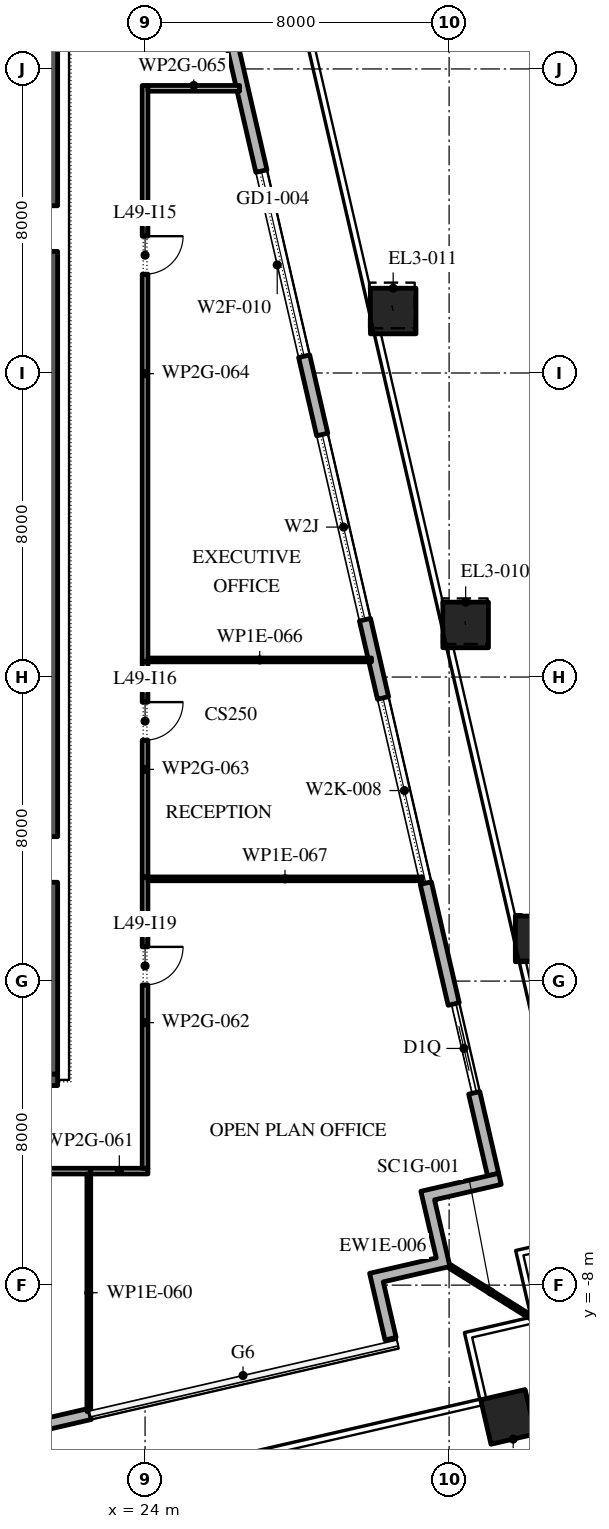
"""IFC4 building model, lengths in metres.
Left out: names, types, materials, properties, quantities, classifications, styles, units other than length and angle.
Written with IfcOpenShell. Run it as: python <this file> out.ifc"""

import sys

from ifc_helpers import new_model, si_unit, direction, frame, frame_2d, origin, origin_2d, place, context, subcontext, project, spatial, polyline, rectangle, outline, extrude, element, fill, save


model = new_model("IFC4")
c1 = context("Model", 3, precision=1e-05, world=origin(), true_north=direction((0.0, 1.0)))
c2 = subcontext(c1, "Body", "Model", "MODEL_VIEW")
j1 = project(units=[si_unit("LENGTHUNIT", "METRE"), si_unit("PLANEANGLEUNIT", "RADIAN")], contexts=[c1])
p1 = place(None, origin())
s1 = spatial("IfcSite", under=j1, at=p1, CompositionType="ELEMENT")
p2 = place(p1, origin())
s2 = spatial("IfcBuilding", under=s1, at=p2, CompositionType="ELEMENT")
p3 = place(p2, frame((0.0, 0.0, 222.0)))
s3 = spatial("IfcBuildingStorey", under=s2, at=p3, CompositionType="ELEMENT", Elevation=222.0)
p4 = place(p3, frame((33.551, -11.467, 0.0), z_axis=(0.0, 0.0, 1.0), x_axis=(0.974370064785, 0.224951054344, 0.0)))
e1 = element("IfcColumn", 1, at=p4, inside=s3, PredefinedType="COLUMN", context=c2, shape_type="SweptSolid", body=[
    extrude(rectangle(XDim=1.2, YDim=1.2, at=origin_2d()), origin(), (0.0, 0.0, 1.0), 4.2),
])
p5 = place(p3, frame((34.342, 1.111, 0.0), z_axis=(-0.002731884952, 0.01168316756, 0.999928017609), x_axis=(-0.973733900744, -0.227689021567, 0.0)))
e2 = element("IfcColumn", 2, at=p5, inside=s3, PredefinedType="COLUMN", context=c2, shape_type="SweptSolid", body=[
    extrude(rectangle(XDim=1.2, YDim=1.2, at=origin_2d()), origin(), (0.0, 0.0, 1.0), 4.2),
])
p6 = place(p3, frame((32.435, 9.37, 0.0), z_axis=(-0.005404479485, 0.023361298418, 0.999712479335), x_axis=(-0.974268511785, -0.225390476607, 0.0)))
e3 = element("IfcColumn", 3, at=p6, inside=s3, PredefinedType="COLUMN", context=c2, shape_type="SweptSolid", body=[
    extrude(rectangle(XDim=1.2, YDim=1.2, at=origin_2d()), origin(), (0.0, 0.0, 1.0), 4.201),
])
p7 = place(p3, frame((30.528, 17.63, 0.0), z_axis=(-0.0080747472, 0.035087390713, 0.999351626541), x_axis=(-0.974526982896, -0.224270282488, 0.0)))
e4 = element("IfcColumn", 4, at=p7, inside=s3, PredefinedType="COLUMN", context=c2, shape_type="SweptSolid", body=[
    extrude(rectangle(XDim=1.2, YDim=1.2, at=origin_2d()), origin(), (0.0, 0.0, 1.0), 4.203),
])
p8 = place(p3, frame((14.465, -13.256, 0.0), z_axis=(0.0, 0.0, 1.0), x_axis=(0.974368386566, 0.224958323385, 0.0)))
e5 = element("IfcWall", 5, at=p8, inside=s3, PredefinedType="STANDARD", context=c2, shape_type="SweptSolid", body=[
    extrude(rectangle(XDim=8.3, YDim=0.3, at=frame_2d((4.15, 0.0))), origin(), (0.0, 0.0, 1.0), 3.75),
])
p9 = place(p8, frame((2.95, 0.0, 0.0)))
e6 = element("IfcOpeningElement", 6, at=p9, cuts=e5, PredefinedType="OPENING", context=c2, shape_type="SweptSolid", body=[
    extrude(rectangle(XDim=2.4, YDim=3.025, at=frame_2d((1.2, 1.512))), frame((0.0, 0.16, 0.0), z_axis=(0.0, -1.0, 0.0), x_axis=(1.0, 0.0, 0.0)), (0.0, 0.0, 1.0), 0.32),
])
p10 = place(p3, frame((33.157, -5.092, 0.0), z_axis=(0.0, 0.0, 1.0), x_axis=(-0.224950279389, 0.974370243697, 0.0)))
e7 = element("IfcWall", 7, at=p10, inside=s3, PredefinedType="STANDARD", context=c2, shape_type="SweptSolid", body=[
    extrude(rectangle(XDim=49.5, YDim=0.3, at=frame_2d((24.75, 0.0))), origin(), (0.0, 0.0, 1.0), 3.75),
])
p11 = place(p10, frame((2.207, 0.0, 0.0)))
e8 = element("IfcOpeningElement", 8, at=p11, cuts=e7, PredefinedType="OPENING", context=c2, shape_type="SweptSolid", body=[
    extrude(rectangle(XDim=2.4, YDim=2.875, at=frame_2d((1.2, 1.438))), frame((0.0, 0.16, 0.0), z_axis=(0.0, -1.0, 0.0), x_axis=(1.0, 0.0, 0.0)), (0.0, 0.0, 1.0), 0.32),
])
p12 = place(p10, frame((7.871, 0.0, 0.45)))
e9 = element("IfcOpeningElement", 9, at=p12, cuts=e7, PredefinedType="OPENING", context=c2, shape_type="SweptSolid", body=[
    extrude(rectangle(XDim=5.0, YDim=2.575, at=frame_2d((2.5, 1.288))), frame((0.0, 0.16, 0.0), z_axis=(0.0, -1.0, 0.0), x_axis=(1.0, 0.0, 0.0)), (0.0, 0.0, 1.0), 0.32),
])
p13 = place(p10, frame((14.986, 0.0, 0.45)))
e10 = element("IfcOpeningElement", 10, at=p13, cuts=e7, PredefinedType="OPENING", context=c2, shape_type="SweptSolid", body=[
    extrude(rectangle(XDim=5.0, YDim=2.625, at=frame_2d((2.5, 1.312))), frame((0.0, 0.16, 0.0), z_axis=(0.0, -1.0, 0.0), x_axis=(1.0, 0.0, 0.0)), (0.0, 0.0, 1.0), 0.32),
])
p14 = place(p10, frame((22.1, 0.0, 0.45)))
e11 = element("IfcOpeningElement", 11, at=p14, cuts=e7, PredefinedType="OPENING", context=c2, shape_type="SweptSolid", body=[
    extrude(rectangle(XDim=5.0, YDim=2.75, at=frame_2d((2.5, 1.375))), frame((0.0, 0.16, 0.0), z_axis=(0.0, -1.0, 0.0), x_axis=(1.0, 0.0, 0.0)), (0.0, 0.0, 1.0), 0.32),
])
p15 = place(p10, frame((30.514, 0.0, 0.0)))
e12 = element("IfcOpeningElement", 12, at=p15, cuts=e7, PredefinedType="OPENING", context=c2, shape_type="SweptSolid", body=[
    extrude(rectangle(XDim=2.4, YDim=3.2, at=frame_2d((1.2, 1.6))), frame((0.0, 0.16, 0.0), z_axis=(0.0, -1.0, 0.0), x_axis=(1.0, 0.0, 0.0)), (0.0, 0.0, 1.0), 0.32),
])
p16 = place(p10, frame((36.329, 0.0, 0.45)))
e13 = element("IfcOpeningElement", 13, at=p16, cuts=e7, PredefinedType="OPENING", context=c2, shape_type="SweptSolid", body=[
    extrude(rectangle(XDim=5.0, YDim=3.25, at=frame_2d((2.5, 1.625))), frame((0.0, 0.16, 0.0), z_axis=(0.0, -1.0, 0.0), x_axis=(1.0, 0.0, 0.0)), (0.0, 0.0, 1.0), 0.32),
])
p17 = place(p10, frame((43.443, 0.0, 0.45)))
e14 = element("IfcOpeningElement", 14, at=p17, cuts=e7, PredefinedType="OPENING", context=c2, shape_type="SweptSolid", body=[
    extrude(rectangle(XDim=5.0, YDim=3.25, at=frame_2d((2.5, 1.625))), frame((0.0, 0.16, 0.0), z_axis=(0.0, -1.0, 0.0), x_axis=(1.0, 0.0, 0.0)), (0.0, 0.0, 1.0), 0.32),
])
p18 = place(p3, origin())
e15 = element("IfcWall", 15, at=p18, inside=s3, PredefinedType="STANDARD", context=c2, shape_type="SweptSolid", body=[
    extrude(outline(polyline([(31.662, -7.285), (31.257, -5.531), (33.303, -5.058), (33.371, -5.351), (31.617, -5.756), (32.022, -7.51), (30.268, -7.914), (30.605, -9.376), (30.313, -9.443), (29.908, -7.69), (31.662, -7.285)])), origin(), (0.0, 0.0, 1.0), 3.75),
])
p19 = place(p3, frame((32.022, -7.51, -0.05), z_axis=(0.0, 0.0, 1.0), x_axis=(0.848047176257, -0.529920736377, 0.0)))
e16 = element("IfcWall", 16, at=p19, inside=s3, PredefinedType="STANDARD", context=c2, shape_type="SweptSolid", body=[
    extrude(rectangle(XDim=2.526, YDim=0.1, at=frame_2d((1.263, 0.0))), origin(), (0.0, 0.0, 1.0), 3.8),
])
p20 = place(p3, frame((21.35, -2.45, 0.0), z_axis=(0.0, 0.0, 1.0), x_axis=(0.0, 1.0, 0.0)))
e17 = element("IfcWall", 17, at=p20, inside=s3, PredefinedType="SHEAR", context=c2, shape_type="SweptSolid", body=[
    extrude(rectangle(XDim=27.9, YDim=0.7, at=frame_2d((13.95, 0.0))), origin(), (0.0, 0.0, 1.0), 3.75),
])
p21 = place(p20, frame((5.05, 0.0, 0.0)))
e18 = element("IfcOpeningElement", 18, at=p21, cuts=e17, PredefinedType="OPENING", context=c2, shape_type="SweptSolid", body=[
    extrude(rectangle(XDim=1.2, YDim=2.1, at=frame_2d((0.6, 1.05))), frame((0.0, 0.36, 0.0), z_axis=(0.0, -1.0, 0.0), x_axis=(1.0, 0.0, 0.0)), (0.0, 0.0, 1.0), 0.72),
])
p22 = place(p20, frame((21.65, 0.0, 0.0)))
e19 = element("IfcOpeningElement", 19, at=p22, cuts=e17, PredefinedType="OPENING", context=c2, shape_type="SweptSolid", body=[
    extrude(rectangle(XDim=1.2, YDim=2.1, at=frame_2d((0.6, 1.05))), frame((0.0, 0.36, 0.0), z_axis=(0.0, -1.0, 0.0), x_axis=(1.0, 0.0, 0.0)), (0.0, 0.0, 1.0), 0.72),
])
p23 = place(p3, frame((10.3, -2.6, 0.0), z_axis=(0.0, 0.0, 1.0), x_axis=(1.0, 0.0, 0.0)))
e20 = element("IfcWall", 20, at=p23, inside=s3, PredefinedType="SHEAR", context=c2, shape_type="SweptSolid", body=[
    extrude(rectangle(XDim=11.4, YDim=0.3, at=frame_2d((5.7, 0.0))), origin(), (0.0, 0.0, 1.0), 3.75),
])
p24 = place(p3, frame((22.57, -5.0, 0.0), z_axis=(0.0, 0.0, 1.0), x_axis=(-1.0, 0.0, 0.0)))
e21 = element("IfcWall", 21, at=p24, inside=s3, PredefinedType="PARTITIONING", context=c2, shape_type="SweptSolid", body=[
    extrude(rectangle(XDim=12.57, YDim=0.15, at=frame_2d((6.285, 0.0))), origin(), (0.0, 0.0, 1.0), 3.75),
])
p25 = place(p24, frame((8.42, 0.0, 0.0)))
e22 = element("IfcOpeningElement", 22, at=p25, cuts=e21, PredefinedType="OPENING", context=c2, shape_type="SweptSolid", body=[
    extrude(rectangle(XDim=1.0, YDim=2.1, at=frame_2d((0.5, 1.05))), frame((0.0, 0.085, 0.0), z_axis=(0.0, -1.0, 0.0), x_axis=(1.0, 0.0, 0.0)), (0.0, 0.0, 1.0), 0.17),
])
p26 = place(p3, frame((22.52, -5.075, 0.0), z_axis=(0.0, 0.0, 1.0), x_axis=(0.0, -1.0, 0.0)))
e23 = element("IfcWall", 23, at=p26, inside=s3, PredefinedType="PARTITIONING", context=c2, shape_type="SweptSolid", body=[
    extrude(rectangle(XDim=6.25, YDim=0.1, at=frame_2d((3.125, 0.0))), origin(), (0.0, 0.0, 1.0), 3.75),
])
p27 = place(p3, frame((24.075, -5.0, 0.0), z_axis=(0.0, 0.0, 1.0), x_axis=(-1.0, 0.0, 0.0)))
e24 = element("IfcWall", 24, at=p27, inside=s3, PredefinedType="PARTITIONING", context=c2, shape_type="SweptSolid", body=[
    extrude(rectangle(XDim=1.505, YDim=0.15, at=frame_2d((0.752, 0.0))), origin(), (0.0, 0.0, 1.0), 3.75),
])
p28 = place(p3, frame((24.0, 2.74, 0.0), z_axis=(0.0, 0.0, 1.0), x_axis=(0.0, -1.0, 0.0)))
e25 = element("IfcWall", 25, at=p28, inside=s3, PredefinedType="PARTITIONING", context=c2, shape_type="SweptSolid", body=[
    extrude(rectangle(XDim=7.665, YDim=0.15, at=frame_2d((3.833, 0.0))), origin(), (0.0, 0.0, 1.0), 3.75),
])
p29 = place(p28, frame((1.84, 0.0, 0.0)))
e26 = element("IfcOpeningElement", 26, at=p29, cuts=e25, PredefinedType="OPENING", context=c2, shape_type="SweptSolid", body=[
    extrude(rectangle(XDim=1.0, YDim=2.1, at=frame_2d((0.5, 1.05))), frame((0.0, 0.085, 0.0), z_axis=(0.0, -1.0, 0.0), x_axis=(1.0, 0.0, 0.0)), (0.0, 0.0, 1.0), 0.17),
])
p30 = place(p3, frame((24.0, 8.4, 0.0), z_axis=(0.0, 0.0, 1.0), x_axis=(0.0, -1.0, 0.0)))
e27 = element("IfcWall", 27, at=p30, inside=s3, PredefinedType="PARTITIONING", context=c2, shape_type="SweptSolid", body=[
    extrude(rectangle(XDim=5.66, YDim=0.15, at=frame_2d((2.83, 0.0))), origin(), (0.0, 0.0, 1.0), 3.75),
])
p31 = place(p30, frame((1.06, 0.0, 0.0)))
e28 = element("IfcOpeningElement", 28, at=p31, cuts=e27, PredefinedType="OPENING", context=c2, shape_type="SweptSolid", body=[
    extrude(rectangle(XDim=1.0, YDim=2.1, at=frame_2d((0.5, 1.05))), frame((0.0, 0.085, 0.0), z_axis=(0.0, -1.0, 0.0), x_axis=(1.0, 0.0, 0.0)), (0.0, 0.0, 1.0), 0.17),
])
p32 = place(p3, frame((24.0, 23.565, 0.0), z_axis=(0.0, 0.0, 1.0), x_axis=(0.0, -1.0, 0.0)))
e29 = element("IfcWall", 29, at=p32, inside=s3, PredefinedType="PARTITIONING", context=c2, shape_type="SweptSolid", body=[
    extrude(rectangle(XDim=15.165, YDim=0.15, at=frame_2d((7.583, 0.0))), origin(), (0.0, 0.0, 1.0), 3.75),
])
p33 = place(p32, frame((3.965, 0.0, 0.0)))
e30 = element("IfcOpeningElement", 30, at=p33, cuts=e29, PredefinedType="OPENING", context=c2, shape_type="SweptSolid", body=[
    extrude(rectangle(XDim=1.0, YDim=2.1, at=frame_2d((0.5, 1.05))), frame((0.0, 0.085, 0.0), z_axis=(0.0, -1.0, 0.0), x_axis=(1.0, 0.0, 0.0)), (0.0, 0.0, 1.0), 0.17),
])
p34 = place(p3, frame((26.487, 23.49, 0.0), z_axis=(0.0, 0.0, 1.0), x_axis=(-1.0, 0.0, 0.0)))
e31 = element("IfcWall", 31, at=p34, inside=s3, PredefinedType="PARTITIONING", context=c2, shape_type="SweptSolid", body=[
    extrude(rectangle(XDim=2.412, YDim=0.15, at=frame_2d((1.206, 0.0))), origin(), (0.0, 0.0, 1.0), 3.75),
])
p35 = place(p3, frame((29.959, 8.45, 0.0), z_axis=(0.0, 0.0, 1.0), x_axis=(-1.0, 0.0, 0.0)))
e32 = element("IfcWall", 32, at=p35, inside=s3, PredefinedType="PARTITIONING", context=c2, shape_type="SweptSolid", body=[
    extrude(rectangle(XDim=5.884, YDim=0.1, at=frame_2d((2.942, 0.0))), origin(), (0.0, 0.0, 1.0), 3.75),
])
p36 = place(p3, frame((31.289, 2.69, 0.0), z_axis=(0.0, 0.0, 1.0), x_axis=(-1.0, 0.0, 0.0)))
e33 = element("IfcWall", 33, at=p36, inside=s3, PredefinedType="PARTITIONING", context=c2, shape_type="SweptSolid", body=[
    extrude(rectangle(XDim=7.214, YDim=0.1, at=frame_2d((3.607, 0.0))), origin(), (0.0, 0.0, 1.0), 3.75),
])
p37 = place(p11, origin())
e34 = element("IfcDoor", 34, at=p37, inside=s3, OperationType="DOUBLE_DOOR_SLIDING", PredefinedType="DOOR", context=c2, shape_type="SweptSolid", body=[
    extrude(rectangle(XDim=2.4, YDim=2.875, at=frame_2d((1.2, 1.438))), frame((0.0, 0.025, 0.0), z_axis=(0.0, -1.0, 0.0), x_axis=(1.0, 0.0, 0.0)), (0.0, 0.0, 1.0), 0.05),
])
fill(e8, e34)
p38 = place(p12, origin())
e35 = element("IfcWindow", 35, at=p38, inside=s3, PartitioningType="DOUBLE_PANEL_VERTICAL", PredefinedType="WINDOW", context=c2, shape_type="SweptSolid", body=[
    extrude(rectangle(XDim=5.0, YDim=2.575, at=frame_2d((2.5, 1.288))), frame((0.0, 0.03, 0.0), z_axis=(0.0, -1.0, 0.0), x_axis=(1.0, 0.0, 0.0)), (0.0, 0.0, 1.0), 0.06),
])
fill(e9, e35)
p39 = place(p13, origin())
e36 = element("IfcWindow", 36, at=p39, inside=s3, PartitioningType="DOUBLE_PANEL_VERTICAL", PredefinedType="WINDOW", context=c2, shape_type="SweptSolid", body=[
    extrude(rectangle(XDim=5.0, YDim=2.625, at=frame_2d((2.5, 1.312))), frame((0.0, 0.03, 0.0), z_axis=(0.0, -1.0, 0.0), x_axis=(1.0, 0.0, 0.0)), (0.0, 0.0, 1.0), 0.06),
])
fill(e10, e36)
p40 = place(p14, origin())
e37 = element("IfcWindow", 37, at=p40, inside=s3, PartitioningType="DOUBLE_PANEL_VERTICAL", PredefinedType="WINDOW", context=c2, shape_type="SweptSolid", body=[
    extrude(rectangle(XDim=5.0, YDim=2.75, at=frame_2d((2.5, 1.375))), frame((0.0, 0.03, 0.0), z_axis=(0.0, -1.0, 0.0), x_axis=(1.0, 0.0, 0.0)), (0.0, 0.0, 1.0), 0.06),
])
fill(e11, e37)
p41 = place(p33, origin())
e38 = element("IfcDoor", 38, at=p41, inside=s3, OperationType="SINGLE_SWING_RIGHT", PredefinedType="DOOR", context=c2, shape_type="SweptSolid", body=[
    extrude(rectangle(XDim=1.0, YDim=2.1, at=frame_2d((0.5, 1.05))), frame((0.0, 0.025, 0.0), z_axis=(0.0, -1.0, 0.0), x_axis=(1.0, 0.0, 0.0)), (0.0, 0.0, 1.0), 0.05),
])
fill(e30, e38)
p42 = place(p31, origin())
e39 = element("IfcDoor", 39, at=p42, inside=s3, OperationType="SINGLE_SWING_RIGHT", PredefinedType="DOOR", context=c2, shape_type="SweptSolid", body=[
    extrude(rectangle(XDim=1.0, YDim=2.1, at=frame_2d((0.5, 1.05))), frame((0.0, 0.025, 0.0), z_axis=(0.0, -1.0, 0.0), x_axis=(1.0, 0.0, 0.0)), (0.0, 0.0, 1.0), 0.05),
])
fill(e28, e39)
p43 = place(p29, origin())
e40 = element("IfcDoor", 40, at=p43, inside=s3, OperationType="SINGLE_SWING_RIGHT", PredefinedType="DOOR", context=c2, shape_type="SweptSolid", body=[
    extrude(rectangle(XDim=1.0, YDim=2.1, at=frame_2d((0.5, 1.05))), frame((0.0, 0.025, 0.0), z_axis=(0.0, -1.0, 0.0), x_axis=(1.0, 0.0, 0.0)), (0.0, 0.0, 1.0), 0.05),
])
fill(e26, e40)
save(model, sys.argv[1])
